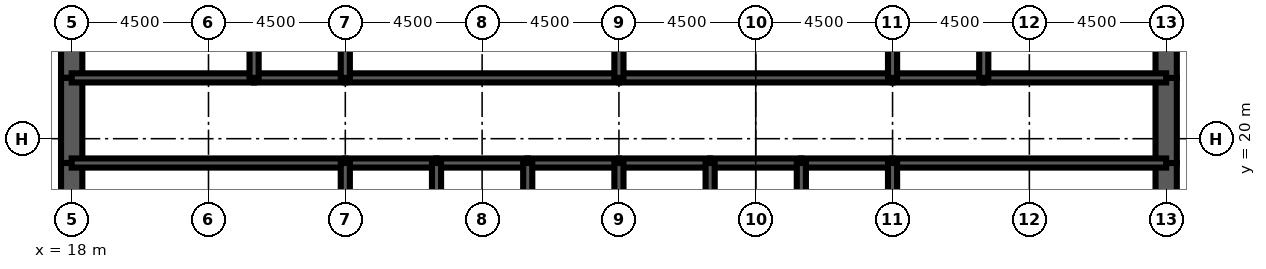
"""IFC4 building model, lengths in metres.
Left out: names, types, materials, properties, quantities, classifications, styles, units other than length and angle.
Written with IfcOpenShell. Run it as: python <this file> out.ifc"""

import sys

from ifc_helpers import new_model, si_unit, direction, frame, frame_2d, origin, place, context, subcontext, project, spatial, rectangle, extrude, element, fill, save


model = new_model("IFC4")
c1 = context("Model", 3, precision=1e-05, world=origin(), true_north=direction((0.0, 1.0)))
c2 = subcontext(c1, "Body", "Model", "MODEL_VIEW")
j1 = project(units=[si_unit("LENGTHUNIT", "METRE"), si_unit("PLANEANGLEUNIT", "RADIAN")], contexts=[c1])
p1 = place(None, origin())
s1 = spatial("IfcSite", under=j1, at=p1, CompositionType="ELEMENT")
p2 = place(p1, origin())
s2 = spatial("IfcBuilding", under=s1, at=p2, CompositionType="ELEMENT")
p3 = place(p2, frame((0.0, 0.0, 271.1)))
s3 = spatial("IfcBuildingStorey", under=s2, at=p3, CompositionType="ELEMENT", Elevation=271.1)
p4 = place(p3, frame((18.0, 26.0, 0.0), z_axis=(0.0, 0.0, 1.0), x_axis=(0.0, -1.0, 0.0)))
e1 = element("IfcWall", 1, at=p4, inside=s3, PredefinedType="SHEAR", context=c2, shape_type="SweptSolid", body=[
    extrude(rectangle(XDim=4.0, YDim=0.7, at=frame_2d((2.0, 0.0))), origin(), (0.0, 0.0, 1.0), 4.2),
])
p5 = place(p3, frame((18.0, 22.0, 0.0), z_axis=(0.0, 0.0, 1.0), x_axis=(0.0, -1.0, 0.0)))
e2 = element("IfcWall", 2, at=p5, inside=s3, PredefinedType="SHEAR", context=c2, shape_type="SweptSolid", body=[
    extrude(rectangle(XDim=2.8, YDim=0.7, at=frame_2d((1.4, 0.0))), origin(), (0.0, 0.0, 1.0), 4.2),
])
p6 = place(p5, frame((0.6, 0.0, 0.0)))
e3 = element("IfcOpeningElement", 3, at=p6, cuts=e2, PredefinedType="OPENING", context=c2, shape_type="SweptSolid", body=[
    extrude(rectangle(XDim=1.8, YDim=2.1, at=frame_2d((0.9, 1.05))), frame((0.0, 0.36, 0.0), z_axis=(0.0, -1.0, 0.0), x_axis=(1.0, 0.0, 0.0)), (0.0, 0.0, 1.0), 0.72),
])
for number, where, z_axis, x_axis in (
    (4, (18.0, 19.2, 0.0), (0.0, 0.0, 1.0), (0.0, -1.0, 0.0)),
    (5, (54.0, 16.0, 0.0), (0.0, 0.0, 1.0), (0.0, 1.0, 0.0)),
):
    element("IfcWall", number, at=place(p3, frame(where, z_axis=z_axis, x_axis=x_axis)), inside=s3, PredefinedType="SHEAR", context=c2, shape_type="SweptSolid", body=[
        extrude(rectangle(XDim=3.2, YDim=0.7, at=frame_2d((1.6, 0.0))), origin(), (0.0, 0.0, 1.0), 4.2),
    ])
p7 = place(p3, frame((54.0, 19.2, 0.0), z_axis=(0.0, 0.0, 1.0), x_axis=(0.0, 1.0, 0.0)))
e6 = element("IfcWall", 6, at=p7, inside=s3, PredefinedType="SHEAR", context=c2, shape_type="SweptSolid", body=[
    extrude(rectangle(XDim=2.8, YDim=0.7, at=frame_2d((1.4, 0.0))), origin(), (0.0, 0.0, 1.0), 4.2),
])
p8 = place(p7, frame((0.4, 0.0, 0.0)))
e7 = element("IfcOpeningElement", 7, at=p8, cuts=e6, PredefinedType="OPENING", context=c2, shape_type="SweptSolid", body=[
    extrude(rectangle(XDim=1.8, YDim=2.1, at=frame_2d((0.9, 1.05))), frame((0.0, 0.36, 0.0), z_axis=(0.0, -1.0, 0.0), x_axis=(1.0, 0.0, 0.0)), (0.0, 0.0, 1.0), 0.72),
])
p9 = place(p3, frame((54.0, 22.0, 0.0), z_axis=(0.0, 0.0, 1.0), x_axis=(0.0, 1.0, 0.0)))
e8 = element("IfcWall", 8, at=p9, inside=s3, PredefinedType="SHEAR", context=c2, shape_type="SweptSolid", body=[
    extrude(rectangle(XDim=4.0, YDim=0.7, at=frame_2d((2.0, 0.0))), origin(), (0.0, 0.0, 1.0), 4.2),
])
p10 = place(p3, frame((18.0, 19.2, 0.0), z_axis=(0.0, 0.0, 1.0), x_axis=(1.0, 0.0, 0.0)))
e9 = element("IfcWall", 9, at=p10, inside=s3, PredefinedType="SOLIDWALL", context=c2, shape_type="SweptSolid", body=[
    extrude(rectangle(XDim=9.0, YDim=0.3, at=frame_2d((4.5, 0.0))), origin(), (0.0, 0.0, 1.0), 4.2),
])
p11 = place(p10, frame((0.65, 0.0, 0.0)))
e10 = element("IfcOpeningElement", 10, at=p11, cuts=e9, PredefinedType="OPENING", context=c2, shape_type="SweptSolid", body=[
    extrude(rectangle(XDim=1.0, YDim=2.1, at=frame_2d((0.5, 1.05))), frame((0.0, 0.16, 0.0), z_axis=(0.0, -1.0, 0.0), x_axis=(1.0, 0.0, 0.0)), (0.0, 0.0, 1.0), 0.32),
])
p12 = place(p3, frame((27.0, 19.2, 0.0), z_axis=(0.0, 0.0, 1.0), x_axis=(1.0, 0.0, 0.0)))
e11 = element("IfcWall", 11, at=p12, inside=s3, PredefinedType="SOLIDWALL", context=c2, shape_type="SweptSolid", body=[
    extrude(rectangle(XDim=3.0, YDim=0.3, at=frame_2d((1.5, 0.0))), origin(), (0.0, 0.0, 1.0), 4.2),
])
p13 = place(p12, frame((0.95, 0.0, 0.0)))
e12 = element("IfcOpeningElement", 12, at=p13, cuts=e11, PredefinedType="OPENING", context=c2, shape_type="SweptSolid", body=[
    extrude(rectangle(XDim=1.1, YDim=2.2, at=frame_2d((0.55, 1.1))), frame((0.0, 0.16, 0.0), z_axis=(0.0, -1.0, 0.0), x_axis=(1.0, 0.0, 0.0)), (0.0, 0.0, 1.0), 0.32),
])
p14 = place(p3, frame((30.0, 19.2, 0.0), z_axis=(0.0, 0.0, 1.0), x_axis=(1.0, 0.0, 0.0)))
e13 = element("IfcWall", 13, at=p14, inside=s3, PredefinedType="SOLIDWALL", context=c2, shape_type="SweptSolid", body=[
    extrude(rectangle(XDim=3.0, YDim=0.3, at=frame_2d((1.5, 0.0))), origin(), (0.0, 0.0, 1.0), 4.2),
])
p15 = place(p14, frame((0.95, 0.0, 0.0)))
e14 = element("IfcOpeningElement", 14, at=p15, cuts=e13, PredefinedType="OPENING", context=c2, shape_type="SweptSolid", body=[
    extrude(rectangle(XDim=1.1, YDim=2.2, at=frame_2d((0.55, 1.1))), frame((0.0, 0.16, 0.0), z_axis=(0.0, -1.0, 0.0), x_axis=(1.0, 0.0, 0.0)), (0.0, 0.0, 1.0), 0.32),
])
p16 = place(p3, frame((33.0, 19.2, 0.0), z_axis=(0.0, 0.0, 1.0), x_axis=(1.0, 0.0, 0.0)))
e15 = element("IfcWall", 15, at=p16, inside=s3, PredefinedType="SOLIDWALL", context=c2, shape_type="SweptSolid", body=[
    extrude(rectangle(XDim=3.0, YDim=0.3, at=frame_2d((1.5, 0.0))), origin(), (0.0, 0.0, 1.0), 4.2),
])
p17 = place(p16, frame((0.95, 0.0, 0.0)))
e16 = element("IfcOpeningElement", 16, at=p17, cuts=e15, PredefinedType="OPENING", context=c2, shape_type="SweptSolid", body=[
    extrude(rectangle(XDim=1.1, YDim=2.2, at=frame_2d((0.55, 1.1))), frame((0.0, 0.16, 0.0), z_axis=(0.0, -1.0, 0.0), x_axis=(1.0, 0.0, 0.0)), (0.0, 0.0, 1.0), 0.32),
])
p18 = place(p3, frame((36.0, 19.2, 0.0), z_axis=(0.0, 0.0, 1.0), x_axis=(1.0, 0.0, 0.0)))
e17 = element("IfcWall", 17, at=p18, inside=s3, PredefinedType="SOLIDWALL", context=c2, shape_type="SweptSolid", body=[
    extrude(rectangle(XDim=3.0, YDim=0.3, at=frame_2d((1.5, 0.0))), origin(), (0.0, 0.0, 1.0), 4.2),
])
p19 = place(p18, frame((0.95, 0.0, 0.0)))
e18 = element("IfcOpeningElement", 18, at=p19, cuts=e17, PredefinedType="OPENING", context=c2, shape_type="SweptSolid", body=[
    extrude(rectangle(XDim=1.1, YDim=2.2, at=frame_2d((0.55, 1.1))), frame((0.0, 0.16, 0.0), z_axis=(0.0, -1.0, 0.0), x_axis=(1.0, 0.0, 0.0)), (0.0, 0.0, 1.0), 0.32),
])
p20 = place(p3, frame((39.0, 19.2, 0.0), z_axis=(0.0, 0.0, 1.0), x_axis=(1.0, 0.0, 0.0)))
e19 = element("IfcWall", 19, at=p20, inside=s3, PredefinedType="SOLIDWALL", context=c2, shape_type="SweptSolid", body=[
    extrude(rectangle(XDim=3.0, YDim=0.3, at=frame_2d((1.5, 0.0))), origin(), (0.0, 0.0, 1.0), 4.2),
])
p21 = place(p20, frame((1.0, 0.0, 0.0)))
e20 = element("IfcOpeningElement", 20, at=p21, cuts=e19, PredefinedType="OPENING", context=c2, shape_type="SweptSolid", body=[
    extrude(rectangle(XDim=1.0, YDim=2.1, at=frame_2d((0.5, 1.05))), frame((0.0, 0.16, 0.0), z_axis=(0.0, -1.0, 0.0), x_axis=(1.0, 0.0, 0.0)), (0.0, 0.0, 1.0), 0.32),
])
p22 = place(p3, frame((42.0, 19.2, 0.0), z_axis=(0.0, 0.0, 1.0), x_axis=(1.0, 0.0, 0.0)))
e21 = element("IfcWall", 21, at=p22, inside=s3, PredefinedType="SOLIDWALL", context=c2, shape_type="SweptSolid", body=[
    extrude(rectangle(XDim=3.0, YDim=0.3, at=frame_2d((1.5, 0.0))), origin(), (0.0, 0.0, 1.0), 4.2),
])
p23 = place(p22, frame((1.0, 0.0, 0.0)))
e22 = element("IfcOpeningElement", 22, at=p23, cuts=e21, PredefinedType="OPENING", context=c2, shape_type="SweptSolid", body=[
    extrude(rectangle(XDim=1.0, YDim=2.1, at=frame_2d((0.5, 1.05))), frame((0.0, 0.16, 0.0), z_axis=(0.0, -1.0, 0.0), x_axis=(1.0, 0.0, 0.0)), (0.0, 0.0, 1.0), 0.32),
])
p24 = place(p3, frame((45.0, 19.2, 0.0), z_axis=(0.0, 0.0, 1.0), x_axis=(1.0, 0.0, 0.0)))
e23 = element("IfcWall", 23, at=p24, inside=s3, PredefinedType="SOLIDWALL", context=c2, shape_type="SweptSolid", body=[
    extrude(rectangle(XDim=9.0, YDim=0.3, at=frame_2d((4.5, 0.0))), origin(), (0.0, 0.0, 1.0), 4.2),
])
p25 = place(p24, frame((7.35, 0.0, 0.0)))
e24 = element("IfcOpeningElement", 24, at=p25, cuts=e23, PredefinedType="OPENING", context=c2, shape_type="SweptSolid", body=[
    extrude(rectangle(XDim=1.0, YDim=2.1, at=frame_2d((0.5, 1.05))), frame((0.0, 0.16, 0.0), z_axis=(0.0, -1.0, 0.0), x_axis=(1.0, 0.0, 0.0)), (0.0, 0.0, 1.0), 0.32),
])
p26 = place(p3, frame((18.0, 22.0, 0.0), z_axis=(0.0, 0.0, 1.0), x_axis=(1.0, 0.0, 0.0)))
e25 = element("IfcWall", 25, at=p26, inside=s3, PredefinedType="SOLIDWALL", context=c2, shape_type="SweptSolid", body=[
    extrude(rectangle(XDim=6.0, YDim=0.3, at=frame_2d((3.0, 0.0))), origin(), (0.0, 0.0, 1.0), 4.2),
])
p27 = place(p26, frame((2.0, 0.0, 0.0)))
e26 = element("IfcOpeningElement", 26, at=p27, cuts=e25, PredefinedType="OPENING", context=c2, shape_type="SweptSolid", body=[
    extrude(rectangle(XDim=1.0, YDim=2.1, at=frame_2d((0.5, 1.05))), frame((0.0, 0.16, 0.0), z_axis=(0.0, -1.0, 0.0), x_axis=(1.0, 0.0, 0.0)), (0.0, 0.0, 1.0), 0.32),
])
p28 = place(p3, frame((24.0, 22.0, 0.0), z_axis=(0.0, 0.0, 1.0), x_axis=(1.0, 0.0, 0.0)))
e27 = element("IfcWall", 27, at=p28, inside=s3, PredefinedType="SOLIDWALL", context=c2, shape_type="SweptSolid", body=[
    extrude(rectangle(XDim=3.0, YDim=0.3, at=frame_2d((1.5, 0.0))), origin(), (0.0, 0.0, 1.0), 4.2),
])
p29 = place(p28, frame((1.0, 0.0, 0.0)))
e28 = element("IfcOpeningElement", 28, at=p29, cuts=e27, PredefinedType="OPENING", context=c2, shape_type="SweptSolid", body=[
    extrude(rectangle(XDim=1.0, YDim=2.1, at=frame_2d((0.5, 1.05))), frame((0.0, 0.16, 0.0), z_axis=(0.0, -1.0, 0.0), x_axis=(1.0, 0.0, 0.0)), (0.0, 0.0, 1.0), 0.32),
])
p30 = place(p3, frame((27.0, 22.0, 0.0), z_axis=(0.0, 0.0, 1.0), x_axis=(1.0, 0.0, 0.0)))
e29 = element("IfcWall", 29, at=p30, inside=s3, PredefinedType="SOLIDWALL", context=c2, shape_type="SweptSolid", body=[
    extrude(rectangle(XDim=9.0, YDim=0.3, at=frame_2d((4.5, 0.0))), origin(), (0.0, 0.0, 1.0), 4.2),
])
p31 = place(p30, frame((4.0, 0.0, 0.0)))
e30 = element("IfcOpeningElement", 30, at=p31, cuts=e29, PredefinedType="OPENING", context=c2, shape_type="SweptSolid", body=[
    extrude(rectangle(XDim=1.0, YDim=2.1, at=frame_2d((0.5, 1.05))), frame((0.0, 0.16, 0.0), z_axis=(0.0, -1.0, 0.0), x_axis=(1.0, 0.0, 0.0)), (0.0, 0.0, 1.0), 0.32),
])
p32 = place(p3, frame((36.0, 22.0, 0.0), z_axis=(0.0, 0.0, 1.0), x_axis=(1.0, 0.0, 0.0)))
e31 = element("IfcWall", 31, at=p32, inside=s3, PredefinedType="SOLIDWALL", context=c2, shape_type="SweptSolid", body=[
    extrude(rectangle(XDim=9.0, YDim=0.3, at=frame_2d((4.5, 0.0))), origin(), (0.0, 0.0, 1.0), 4.2),
])
p33 = place(p32, frame((4.0, 0.0, 0.0)))
e32 = element("IfcOpeningElement", 32, at=p33, cuts=e31, PredefinedType="OPENING", context=c2, shape_type="SweptSolid", body=[
    extrude(rectangle(XDim=1.0, YDim=2.1, at=frame_2d((0.5, 1.05))), frame((0.0, 0.16, 0.0), z_axis=(0.0, -1.0, 0.0), x_axis=(1.0, 0.0, 0.0)), (0.0, 0.0, 1.0), 0.32),
])
p34 = place(p3, frame((45.0, 22.0, 0.0), z_axis=(0.0, 0.0, 1.0), x_axis=(1.0, 0.0, 0.0)))
e33 = element("IfcWall", 33, at=p34, inside=s3, PredefinedType="SOLIDWALL", context=c2, shape_type="SweptSolid", body=[
    extrude(rectangle(XDim=3.0, YDim=0.3, at=frame_2d((1.5, 0.0))), origin(), (0.0, 0.0, 1.0), 4.2),
])
p35 = place(p34, frame((1.0, 0.0, 0.0)))
e34 = element("IfcOpeningElement", 34, at=p35, cuts=e33, PredefinedType="OPENING", context=c2, shape_type="SweptSolid", body=[
    extrude(rectangle(XDim=1.0, YDim=2.1, at=frame_2d((0.5, 1.05))), frame((0.0, 0.16, 0.0), z_axis=(0.0, -1.0, 0.0), x_axis=(1.0, 0.0, 0.0)), (0.0, 0.0, 1.0), 0.32),
])
p36 = place(p3, frame((48.0, 22.0, 0.0), z_axis=(0.0, 0.0, 1.0), x_axis=(1.0, 0.0, 0.0)))
e35 = element("IfcWall", 35, at=p36, inside=s3, PredefinedType="SOLIDWALL", context=c2, shape_type="SweptSolid", body=[
    extrude(rectangle(XDim=6.0, YDim=0.3, at=frame_2d((3.0, 0.0))), origin(), (0.0, 0.0, 1.0), 4.2),
])
p37 = place(p36, frame((2.0, 0.0, 0.0)))
e36 = element("IfcOpeningElement", 36, at=p37, cuts=e35, PredefinedType="OPENING", context=c2, shape_type="SweptSolid", body=[
    extrude(rectangle(XDim=1.0, YDim=2.1, at=frame_2d((0.5, 1.05))), frame((0.0, 0.16, 0.0), z_axis=(0.0, -1.0, 0.0), x_axis=(1.0, 0.0, 0.0)), (0.0, 0.0, 1.0), 0.32),
])
p38 = place(p36, frame((4.4, 0.0, 0.0)))
e37 = element("IfcOpeningElement", 37, at=p38, cuts=e35, PredefinedType="OPENING", context=c2, shape_type="SweptSolid", body=[
    extrude(rectangle(XDim=1.0, YDim=2.1, at=frame_2d((0.5, 1.05))), frame((0.0, 0.16, 0.0), z_axis=(0.0, -1.0, 0.0), x_axis=(1.0, 0.0, 0.0)), (0.0, 0.0, 1.0), 0.32),
])
for number, where, z_axis, x_axis in (
    (38, (27.0, 16.0, 0.0), (0.0, 0.0, 1.0), (0.0, 1.0, 0.0)),
    (39, (30.0, 16.0, 0.0), (0.0, 0.0, 1.0), (0.0, 1.0, 0.0)),
    (40, (33.0, 16.0, 0.0), (0.0, 0.0, 1.0), (0.0, 1.0, 0.0)),
    (41, (36.0, 16.0, 0.0), (0.0, 0.0, 1.0), (0.0, 1.0, 0.0)),
    (42, (39.0, 16.0, 0.0), (0.0, 0.0, 1.0), (0.0, 1.0, 0.0)),
    (43, (42.0, 16.0, 0.0), (0.0, 0.0, 1.0), (0.0, 1.0, 0.0)),
    (44, (45.0, 16.0, 0.0), (0.0, 0.0, 1.0), (0.0, 1.0, 0.0)),
):
    element("IfcWall", number, at=place(p3, frame(where, z_axis=z_axis, x_axis=x_axis)), inside=s3, PredefinedType="SOLIDWALL", context=c2, shape_type="SweptSolid", body=[
        extrude(rectangle(XDim=3.2, YDim=0.3, at=frame_2d((1.6, 0.0))), origin(), (0.0, 0.0, 1.0), 4.2),
    ])
for number, where, z_axis, x_axis in (
    (45, (24.0, 22.0, 0.0), (0.0, 0.0, 1.0), (0.0, 1.0, 0.0)),
    (46, (27.0, 22.0, 0.0), (0.0, 0.0, 1.0), (0.0, 1.0, 0.0)),
    (47, (36.0, 22.0, 0.0), (0.0, 0.0, 1.0), (0.0, 1.0, 0.0)),
    (48, (45.0, 22.0, 0.0), (0.0, 0.0, 1.0), (0.0, 1.0, 0.0)),
    (49, (48.0, 22.0, 0.0), (0.0, 0.0, 1.0), (0.0, 1.0, 0.0)),
):
    element("IfcWall", number, at=place(p3, frame(where, z_axis=z_axis, x_axis=x_axis)), inside=s3, PredefinedType="SOLIDWALL", context=c2, shape_type="SweptSolid", body=[
        extrude(rectangle(XDim=4.0, YDim=0.3, at=frame_2d((2.0, 0.0))), origin(), (0.0, 0.0, 1.0), 4.2),
    ])
p39 = place(p3, frame((38.5, 22.15, 0.0), z_axis=(0.0, 0.0, 1.0), x_axis=(0.0, 1.0, 0.0)))
e50 = element("IfcWall", 50, at=p39, inside=s3, PredefinedType="PARTITIONING", context=c2, shape_type="SweptSolid", body=[
    extrude(rectangle(XDim=3.7, YDim=0.15, at=frame_2d((1.85, 0.0))), origin(), (0.0, 0.0, 1.0), 3.0),
])
p40 = place(p39, frame((2.2, 0.0, 0.0)))
e51 = element("IfcOpeningElement", 51, at=p40, cuts=e50, PredefinedType="OPENING", context=c2, shape_type="SweptSolid", body=[
    extrude(rectangle(XDim=1.0, YDim=2.1, at=frame_2d((0.5, 1.05))), frame((0.0, 0.085, 0.0), z_axis=(0.0, -1.0, 0.0), x_axis=(1.0, 0.0, 0.0)), (0.0, 0.0, 1.0), 0.17),
])
p41 = place(p3, frame((52.075, 22.15, 0.0), z_axis=(0.0, 0.0, 1.0), x_axis=(0.0, 1.0, 0.0)))
e52 = element("IfcWall", 52, at=p41, inside=s3, PredefinedType="PARTITIONING", context=c2, shape_type="SweptSolid", body=[
    extrude(rectangle(XDim=3.7, YDim=0.15, at=frame_2d((1.85, 0.0))), origin(), (0.0, 0.0, 1.0), 3.0),
])
p42 = place(p13, origin())
e53 = element("IfcDoor", 53, at=p42, inside=s3, OperationType="DOUBLE_DOOR_SLIDING", PredefinedType="USERDEFINED", context=c2, shape_type="SweptSolid", body=[
    extrude(rectangle(XDim=1.1, YDim=2.2, at=frame_2d((0.55, 1.1))), frame((0.0, 0.025, 0.0), z_axis=(0.0, -1.0, 0.0), x_axis=(1.0, 0.0, 0.0)), (0.0, 0.0, 1.0), 0.05),
])
fill(e12, e53)
p43 = place(p15, origin())
e54 = element("IfcDoor", 54, at=p43, inside=s3, OperationType="DOUBLE_DOOR_SLIDING", PredefinedType="USERDEFINED", context=c2, shape_type="SweptSolid", body=[
    extrude(rectangle(XDim=1.1, YDim=2.2, at=frame_2d((0.55, 1.1))), frame((0.0, 0.025, 0.0), z_axis=(0.0, -1.0, 0.0), x_axis=(1.0, 0.0, 0.0)), (0.0, 0.0, 1.0), 0.05),
])
fill(e14, e54)
p44 = place(p17, origin())
e55 = element("IfcDoor", 55, at=p44, inside=s3, OperationType="DOUBLE_DOOR_SLIDING", PredefinedType="USERDEFINED", context=c2, shape_type="SweptSolid", body=[
    extrude(rectangle(XDim=1.1, YDim=2.2, at=frame_2d((0.55, 1.1))), frame((0.0, 0.025, 0.0), z_axis=(0.0, -1.0, 0.0), x_axis=(1.0, 0.0, 0.0)), (0.0, 0.0, 1.0), 0.05),
])
fill(e16, e55)
p45 = place(p19, origin())
e56 = element("IfcDoor", 56, at=p45, inside=s3, OperationType="DOUBLE_DOOR_SLIDING", PredefinedType="USERDEFINED", context=c2, shape_type="SweptSolid", body=[
    extrude(rectangle(XDim=1.1, YDim=2.2, at=frame_2d((0.55, 1.1))), frame((0.0, 0.025, 0.0), z_axis=(0.0, -1.0, 0.0), x_axis=(1.0, 0.0, 0.0)), (0.0, 0.0, 1.0), 0.05),
])
fill(e18, e56)
p46 = place(p11, origin())
e57 = element("IfcDoor", 57, at=p46, inside=s3, OperationType="SINGLE_SWING_LEFT", PredefinedType="DOOR", context=c2, shape_type="SweptSolid", body=[
    extrude(rectangle(XDim=1.0, YDim=2.1, at=frame_2d((0.5, 1.05))), frame((0.0, 0.025, 0.0), z_axis=(0.0, -1.0, 0.0), x_axis=(1.0, 0.0, 0.0)), (0.0, 0.0, 1.0), 0.05),
])
fill(e10, e57)
p47 = place(p25, origin())
e58 = element("IfcDoor", 58, at=p47, inside=s3, OperationType="SINGLE_SWING_RIGHT", PredefinedType="DOOR", context=c2, shape_type="SweptSolid", body=[
    extrude(rectangle(XDim=1.0, YDim=2.1, at=frame_2d((0.5, 1.05))), frame((0.0, 0.025, 0.0), z_axis=(0.0, -1.0, 0.0), x_axis=(1.0, 0.0, 0.0)), (0.0, 0.0, 1.0), 0.05),
])
fill(e24, e58)
p48 = place(p6, origin())
e59 = element("IfcDoor", 59, at=p48, inside=s3, OperationType="SINGLE_SWING_LEFT", PredefinedType="DOOR", context=c2, shape_type="SweptSolid", body=[
    extrude(rectangle(XDim=1.8, YDim=2.1, at=frame_2d((0.9, 1.05))), frame((0.0, 0.35, 0.0), z_axis=(0.0, -1.0, 0.0), x_axis=(1.0, 0.0, 0.0)), (0.0, 0.0, 1.0), 0.699),
])
fill(e3, e59)
p49 = place(p8, origin())
e60 = element("IfcDoor", 60, at=p49, inside=s3, OperationType="SINGLE_SWING_LEFT", PredefinedType="DOOR", context=c2, shape_type="SweptSolid", body=[
    extrude(rectangle(XDim=1.8, YDim=2.1, at=frame_2d((0.9, 1.05))), frame((0.0, 0.35, 0.0), z_axis=(0.0, -1.0, 0.0), x_axis=(1.0, 0.0, 0.0)), (0.0, 0.0, 1.0), 0.699),
])
fill(e7, e60)
p50 = place(p27, origin())
e61 = element("IfcDoor", 61, at=p50, inside=s3, OperationType="SINGLE_SWING_LEFT", PredefinedType="DOOR", context=c2, shape_type="SweptSolid", body=[
    extrude(rectangle(XDim=1.0, YDim=2.1, at=frame_2d((0.5, 1.05))), frame((0.0, 0.025, 0.0), z_axis=(0.0, -1.0, 0.0), x_axis=(1.0, 0.0, 0.0)), (0.0, 0.0, 1.0), 0.05),
])
fill(e26, e61)
p51 = place(p29, origin())
e62 = element("IfcDoor", 62, at=p51, inside=s3, OperationType="SINGLE_SWING_LEFT", PredefinedType="DOOR", context=c2, shape_type="SweptSolid", body=[
    extrude(rectangle(XDim=1.0, YDim=2.1, at=frame_2d((0.5, 1.05))), frame((0.0, 0.025, 0.0), z_axis=(0.0, -1.0, 0.0), x_axis=(1.0, 0.0, 0.0)), (0.0, 0.0, 1.0), 0.05),
])
fill(e28, e62)
p52 = place(p31, origin())
e63 = element("IfcDoor", 63, at=p52, inside=s3, OperationType="SINGLE_SWING_LEFT", PredefinedType="DOOR", context=c2, shape_type="SweptSolid", body=[
    extrude(rectangle(XDim=1.0, YDim=2.1, at=frame_2d((0.5, 1.05))), frame((0.0, 0.025, 0.0), z_axis=(0.0, -1.0, 0.0), x_axis=(1.0, 0.0, 0.0)), (0.0, 0.0, 1.0), 0.05),
])
fill(e30, e63)
p53 = place(p33, origin())
e64 = element("IfcDoor", 64, at=p53, inside=s3, OperationType="SINGLE_SWING_LEFT", PredefinedType="DOOR", context=c2, shape_type="SweptSolid", body=[
    extrude(rectangle(XDim=1.0, YDim=2.1, at=frame_2d((0.5, 1.05))), frame((0.0, 0.025, 0.0), z_axis=(0.0, -1.0, 0.0), x_axis=(1.0, 0.0, 0.0)), (0.0, 0.0, 1.0), 0.05),
])
fill(e32, e64)
p54 = place(p35, origin())
e65 = element("IfcDoor", 65, at=p54, inside=s3, OperationType="SINGLE_SWING_LEFT", PredefinedType="DOOR", context=c2, shape_type="SweptSolid", body=[
    extrude(rectangle(XDim=1.0, YDim=2.1, at=frame_2d((0.5, 1.05))), frame((0.0, 0.025, 0.0), z_axis=(0.0, -1.0, 0.0), x_axis=(1.0, 0.0, 0.0)), (0.0, 0.0, 1.0), 0.05),
])
fill(e34, e65)
p55 = place(p37, origin())
e66 = element("IfcDoor", 66, at=p55, inside=s3, OperationType="SINGLE_SWING_LEFT", PredefinedType="DOOR", context=c2, shape_type="SweptSolid", body=[
    extrude(rectangle(XDim=1.0, YDim=2.1, at=frame_2d((0.5, 1.05))), frame((0.0, 0.025, 0.0), z_axis=(0.0, -1.0, 0.0), x_axis=(1.0, 0.0, 0.0)), (0.0, 0.0, 1.0), 0.05),
])
fill(e36, e66)
p56 = place(p38, origin())
e67 = element("IfcDoor", 67, at=p56, inside=s3, OperationType="SINGLE_SWING_RIGHT", PredefinedType="DOOR", context=c2, shape_type="SweptSolid", body=[
    extrude(rectangle(XDim=1.0, YDim=2.1, at=frame_2d((0.5, 1.05))), frame((0.0, 0.025, 0.0), z_axis=(0.0, -1.0, 0.0), x_axis=(1.0, 0.0, 0.0)), (0.0, 0.0, 1.0), 0.05),
])
fill(e37, e67)
p57 = place(p21, origin())
e68 = element("IfcDoor", 68, at=p57, inside=s3, OperationType="SINGLE_SWING_LEFT", PredefinedType="DOOR", context=c2, shape_type="SweptSolid", body=[
    extrude(rectangle(XDim=1.0, YDim=2.1, at=frame_2d((0.5, 1.05))), frame((0.0, 0.025, 0.0), z_axis=(0.0, -1.0, 0.0), x_axis=(1.0, 0.0, 0.0)), (0.0, 0.0, 1.0), 0.05),
])
fill(e20, e68)
p58 = place(p23, origin())
e69 = element("IfcDoor", 69, at=p58, inside=s3, OperationType="SINGLE_SWING_LEFT", PredefinedType="DOOR", context=c2, shape_type="SweptSolid", body=[
    extrude(rectangle(XDim=1.0, YDim=2.1, at=frame_2d((0.5, 1.05))), frame((0.0, 0.025, 0.0), z_axis=(0.0, -1.0, 0.0), x_axis=(1.0, 0.0, 0.0)), (0.0, 0.0, 1.0), 0.05),
])
fill(e22, e69)
save(model, sys.argv[1])
